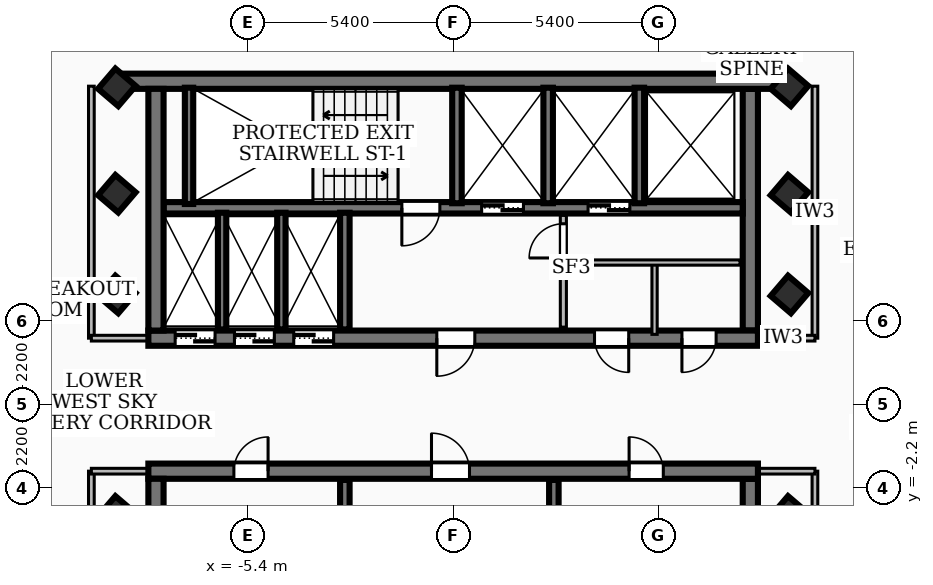
"""IFC4 building model, lengths in metres.
Left out: names, types, materials, properties, quantities, classifications, styles, units other than length and angle.
Written with IfcOpenShell. Run it as: python <this file> out.ifc"""

import sys

from ifc_helpers import new_model, si_unit, direction, frame, frame_2d, origin, origin_2d, place, context, subcontext, project, spatial, rectangle, extrude, element, fill, save


model = new_model("IFC4")
c1 = context("Model", 3, precision=1e-05, world=origin(), true_north=direction((0.0, 1.0)))
c2 = subcontext(c1, "Body", "Model", "MODEL_VIEW")
j1 = project(units=[si_unit("LENGTHUNIT", "METRE"), si_unit("PLANEANGLEUNIT", "RADIAN")], contexts=[c1])
p1 = place(None, origin())
s1 = spatial("IfcSite", under=j1, at=p1, CompositionType="ELEMENT")
p2 = place(p1, origin())
s2 = spatial("IfcBuilding", under=s1, at=p2, CompositionType="ELEMENT")
p3 = place(p2, frame((0.0, 0.0, 250.92)))
s3 = spatial("IfcBuildingStorey", under=s2, at=p3, CompositionType="ELEMENT", Elevation=250.92)
p4 = place(p3, frame((-8.78, 8.51, 0.0), z_axis=(0.0, 0.0, 1.0), x_axis=(1.0, 0.0, 0.0)))
e1 = element("IfcWall", 1, at=p4, inside=s3, PredefinedType="SHEAR", context=c2, shape_type="SweptSolid", body=[
    extrude(rectangle(XDim=17.56, YDim=0.4, at=frame_2d((8.78, 0.0))), origin(), (0.0, 0.0, 1.0), 3.16),
])
p5 = place(p3, frame((8.02, 1.75, 0.0), z_axis=(0.0, 0.0, 1.0), x_axis=(-1.0, 0.0, 0.0)))
e2 = element("IfcWall", 2, at=p5, inside=s3, PredefinedType="SHEAR", context=c2, shape_type="SweptSolid", body=[
    extrude(rectangle(XDim=16.04, YDim=0.4, at=frame_2d((8.02, 0.0))), origin(), (0.0, 0.0, 1.0), 3.16),
])
p6 = place(p5, frame((7.45, 0.0, 0.0)))
e3 = element("IfcOpeningElement", 3, at=p6, cuts=e2, PredefinedType="OPENING", context=c2, shape_type="SweptSolid", body=[
    extrude(rectangle(XDim=1.0, YDim=2.1, at=frame_2d((0.5, 1.05))), frame((0.0, 0.21, 0.0), z_axis=(0.0, -1.0, 0.0), x_axis=(1.0, 0.0, 0.0)), (0.0, 0.0, 1.0), 0.42),
])
p7 = place(p5, frame((14.285, 0.0, 0.0)))
e4 = element("IfcOpeningElement", 4, at=p7, cuts=e2, PredefinedType="OPENING", context=c2, shape_type="SweptSolid", body=[
    extrude(rectangle(XDim=1.05, YDim=2.15, at=frame_2d((0.525, 1.075))), frame((0.0, 0.21, 0.0), z_axis=(0.0, -1.0, 0.0), x_axis=(1.0, 0.0, 0.0)), (0.0, 0.0, 1.0), 0.42),
])
p8 = place(p5, frame((12.725, 0.0, 0.0)))
e5 = element("IfcOpeningElement", 5, at=p8, cuts=e2, PredefinedType="OPENING", context=c2, shape_type="SweptSolid", body=[
    extrude(rectangle(XDim=1.05, YDim=2.15, at=frame_2d((0.525, 1.075))), frame((0.0, 0.21, 0.0), z_axis=(0.0, -1.0, 0.0), x_axis=(1.0, 0.0, 0.0)), (0.0, 0.0, 1.0), 0.42),
])
p9 = place(p5, frame((11.165, 0.0, 0.0)))
e6 = element("IfcOpeningElement", 6, at=p9, cuts=e2, PredefinedType="OPENING", context=c2, shape_type="SweptSolid", body=[
    extrude(rectangle(XDim=1.05, YDim=2.15, at=frame_2d((0.525, 1.075))), frame((0.0, 0.21, 0.0), z_axis=(0.0, -1.0, 0.0), x_axis=(1.0, 0.0, 0.0)), (0.0, 0.0, 1.0), 0.42),
])
p10 = place(p5, frame((3.4, 0.0, 0.0)))
e7 = element("IfcOpeningElement", 7, at=p10, cuts=e2, PredefinedType="OPENING", context=c2, shape_type="SweptSolid", body=[
    extrude(rectangle(XDim=0.9, YDim=2.06, at=frame_2d((0.45, 1.03))), frame((0.0, 0.21, 0.0), z_axis=(0.0, -1.0, 0.0), x_axis=(1.0, 0.0, 0.0)), (0.0, 0.0, 1.0), 0.42),
])
p11 = place(p5, frame((1.1, 0.0, 0.0)))
e8 = element("IfcOpeningElement", 8, at=p11, cuts=e2, PredefinedType="OPENING", context=c2, shape_type="SweptSolid", body=[
    extrude(rectangle(XDim=0.9, YDim=2.06, at=frame_2d((0.45, 1.03))), frame((0.0, 0.21, 0.0), z_axis=(0.0, -1.0, 0.0), x_axis=(1.0, 0.0, 0.0)), (0.0, 0.0, 1.0), 0.42),
])
for number, where, z_axis, x_axis in (
    (9, (-7.82, 1.95, 0.0), (0.0, 0.0, 1.0), (0.0, 1.0, 0.0)),
    (10, (7.82, 8.31, 0.0), (0.0, 0.0, 1.0), (0.0, -1.0, 0.0)),
):
    element("IfcWall", number, at=place(p3, frame(where, z_axis=z_axis, x_axis=x_axis)), inside=s3, PredefinedType="SHEAR", context=c2, shape_type="SweptSolid", body=[
        extrude(rectangle(XDim=6.36, YDim=0.4, at=frame_2d((3.18, 0.0))), origin(), (0.0, 0.0, 1.0), 3.16),
    ])
p12 = place(p3, frame((7.62, 5.18, 0.0), z_axis=(0.0, 0.0, 1.0), x_axis=(-1.0, 0.0, 0.0)))
e11 = element("IfcWall", 11, at=p12, inside=s3, PredefinedType="SOLIDWALL", context=c2, shape_type="SweptSolid", body=[
    extrude(rectangle(XDim=15.24, YDim=0.3, at=frame_2d((7.62, 0.0))), origin(), (0.0, 0.0, 1.0), 3.16),
])
p13 = place(p12, frame((5.77, 0.0, 0.0)))
e12 = element("IfcOpeningElement", 12, at=p13, cuts=e11, PredefinedType="OPENING", context=c2, shape_type="SweptSolid", body=[
    extrude(rectangle(XDim=1.1, YDim=2.15, at=frame_2d((0.55, 1.075))), frame((0.0, 0.16, 0.0), z_axis=(0.0, -1.0, 0.0), x_axis=(1.0, 0.0, 0.0)), (0.0, 0.0, 1.0), 0.32),
])
p14 = place(p12, frame((2.97, 0.0, 0.0)))
e13 = element("IfcOpeningElement", 13, at=p14, cuts=e11, PredefinedType="OPENING", context=c2, shape_type="SweptSolid", body=[
    extrude(rectangle(XDim=1.1, YDim=2.15, at=frame_2d((0.55, 1.075))), frame((0.0, 0.16, 0.0), z_axis=(0.0, -1.0, 0.0), x_axis=(1.0, 0.0, 0.0)), (0.0, 0.0, 1.0), 0.32),
])
p15 = place(p12, frame((7.97, 0.0, 0.0)))
e14 = element("IfcOpeningElement", 14, at=p15, cuts=e11, PredefinedType="OPENING", context=c2, shape_type="SweptSolid", body=[
    extrude(rectangle(XDim=1.0, YDim=2.1, at=frame_2d((0.5, 1.05))), frame((0.0, 0.16, 0.0), z_axis=(0.0, -1.0, 0.0), x_axis=(1.0, 0.0, 0.0)), (0.0, 0.0, 1.0), 0.32),
])
p16 = place(p3, frame((-8.02, -1.75, 0.0), z_axis=(0.0, 0.0, 1.0), x_axis=(1.0, 0.0, 0.0)))
e15 = element("IfcWall", 15, at=p16, inside=s3, PredefinedType="SHEAR", context=c2, shape_type="SweptSolid", body=[
    extrude(rectangle(XDim=16.04, YDim=0.4, at=frame_2d((8.02, 0.0))), origin(), (0.0, 0.0, 1.0), 3.16),
])
p17 = place(p16, frame((7.45, 0.0, 0.0)))
e16 = element("IfcOpeningElement", 16, at=p17, cuts=e15, PredefinedType="OPENING", context=c2, shape_type="SweptSolid", body=[
    extrude(rectangle(XDim=1.0, YDim=2.1, at=frame_2d((0.5, 1.05))), frame((0.0, 0.21, 0.0), z_axis=(0.0, -1.0, 0.0), x_axis=(1.0, 0.0, 0.0)), (0.0, 0.0, 1.0), 0.42),
])
p18 = place(p16, frame((12.65, 0.0, 0.0)))
e17 = element("IfcOpeningElement", 17, at=p18, cuts=e15, PredefinedType="OPENING", context=c2, shape_type="SweptSolid", body=[
    extrude(rectangle(XDim=0.9, YDim=2.06, at=frame_2d((0.45, 1.03))), frame((0.0, 0.21, 0.0), z_axis=(0.0, -1.0, 0.0), x_axis=(1.0, 0.0, 0.0)), (0.0, 0.0, 1.0), 0.42),
])
p19 = place(p16, frame((2.25, 0.0, 0.0)))
e18 = element("IfcOpeningElement", 18, at=p19, cuts=e15, PredefinedType="OPENING", context=c2, shape_type="SweptSolid", body=[
    extrude(rectangle(XDim=0.9, YDim=2.06, at=frame_2d((0.45, 1.03))), frame((0.0, 0.21, 0.0), z_axis=(0.0, -1.0, 0.0), x_axis=(1.0, 0.0, 0.0)), (0.0, 0.0, 1.0), 0.42),
])
for number, where, z_axis, x_axis in (
    (19, (-7.82, -8.31, 0.0), (0.0, 0.0, 1.0), (0.0, 1.0, 0.0)),
    (20, (7.82, -1.95, 0.0), (0.0, 0.0, 1.0), (0.0, -1.0, 0.0)),
):
    element("IfcWall", number, at=place(p3, frame(where, z_axis=z_axis, x_axis=x_axis)), inside=s3, PredefinedType="SHEAR", context=c2, shape_type="SweptSolid", body=[
        extrude(rectangle(XDim=6.36, YDim=0.4, at=frame_2d((3.18, 0.0))), origin(), (0.0, 0.0, 1.0), 3.16),
    ])
p20 = place(p3, frame((-6.95, 5.28, 0.0), z_axis=(0.0, 0.0, 1.0), x_axis=(0.0, 1.0, 0.0)))
e21 = element("IfcWall", 21, at=p20, inside=s3, PredefinedType="SOLIDWALL", context=c2, shape_type="SweptSolid", body=[
    extrude(rectangle(XDim=3.06, YDim=0.22, at=frame_2d((1.53, 0.0))), origin(), (0.0, 0.0, 1.0), 3.16),
])
for number, where, z_axis, x_axis in (
    (22, (0.1, 5.3, 0.0), (0.0, 0.0, 1.0), (0.0, 1.0, 0.0)),
    (23, (2.5, 5.3, 0.0), (0.0, 0.0, 1.0), (0.0, 1.0, 0.0)),
    (24, (4.9, 5.3, 0.0), (0.0, 0.0, 1.0), (0.0, 1.0, 0.0)),
):
    element("IfcWall", number, at=place(p3, frame(where, z_axis=z_axis, x_axis=x_axis)), inside=s3, PredefinedType="SOLIDWALL", context=c2, shape_type="SweptSolid", body=[
        extrude(rectangle(XDim=3.04, YDim=0.25, at=frame_2d((1.52, 0.0))), origin(), (0.0, 0.0, 1.0), 3.16),
    ])
for number, where, z_axis, x_axis in (
    (25, (-2.85, 1.98, 0.0), (0.0, 0.0, 1.0), (0.0, 1.0, 0.0)),
    (26, (-2.85, -5.05, 0.0), (0.0, 0.0, 1.0), (0.0, 1.0, 0.0)),
    (27, (2.65, -5.05, 0.0), (0.0, 0.0, 1.0), (0.0, 1.0, 0.0)),
):
    element("IfcWall", number, at=place(p3, frame(where, z_axis=z_axis, x_axis=x_axis)), inside=s3, PredefinedType="SOLIDWALL", context=c2, shape_type="SweptSolid", body=[
        extrude(rectangle(XDim=3.07, YDim=0.25, at=frame_2d((1.535, 0.0))), origin(), (0.0, 0.0, 1.0), 3.16),
    ])
for number, where, z_axis, x_axis in (
    (28, (-6.08, 1.98, 0.0), (0.0, 0.0, 1.0), (0.0, 1.0, 0.0)),
    (29, (-4.52, 1.98, 0.0), (0.0, 0.0, 1.0), (0.0, 1.0, 0.0)),
):
    element("IfcWall", number, at=place(p3, frame(where, z_axis=z_axis, x_axis=x_axis)), inside=s3, PredefinedType="SOLIDWALL", context=c2, shape_type="SweptSolid", body=[
        extrude(rectangle(XDim=3.07, YDim=0.22, at=frame_2d((1.535, 0.0))), origin(), (0.0, 0.0, 1.0), 3.16),
    ])
for number, where, z_axis, x_axis in (
    (30, (-8.85, -2.9, 0.0), (0.0, 0.0, 1.0), (0.65, 0.76, 0.0)),
    (31, (-8.85, 2.9, 0.0), (0.0, 0.0, 1.0), (0.65, 0.76, 0.0)),
    (32, (-8.85, 5.55, 0.0), (0.0, 0.0, 1.0), (0.65, 0.76, 0.0)),
    (33, (8.85, -2.9, 0.0), (0.0, 0.0, 1.0), (0.65, 0.76, 0.0)),
    (34, (8.85, 2.9, 0.0), (0.0, 0.0, 1.0), (0.65, 0.76, 0.0)),
    (35, (8.85, 5.55, 0.0), (0.0, 0.0, 1.0), (0.65, 0.76, 0.0)),
    (36, (-8.85, 8.35, 0.0), (0.0, 0.0, 1.0), (0.65, 0.76, 0.0)),
    (37, (8.85, 8.35, 0.0), (0.0, 0.0, 1.0), (0.65, 0.76, 0.0)),
):
    element("IfcColumn", number, at=place(p3, frame(where, z_axis=z_axis, x_axis=x_axis)), inside=s3, PredefinedType="COLUMN", context=c2, shape_type="SweptSolid", body=[
        extrude(rectangle(XDim=0.7, YDim=0.7, at=origin_2d()), origin(), (0.0, 0.0, 1.0), 3.42),
    ])
p21 = place(p3, frame((2.9, 2.04, 0.0), z_axis=(0.0, 0.0, 1.0), x_axis=(0.0, 1.0, 0.0)))
e38 = element("IfcWall", 38, at=p21, inside=s3, PredefinedType="PARTITIONING", context=c2, shape_type="SweptSolid", body=[
    extrude(rectangle(XDim=2.94, YDim=0.16, at=frame_2d((1.47, 0.0))), origin(), (0.0, 0.0, 1.0), 2.39),
])
p22 = place(p21, frame((1.82, 0.0, 0.0)))
e39 = element("IfcOpeningElement", 39, at=p22, cuts=e38, PredefinedType="OPENING", context=c2, shape_type="SweptSolid", body=[
    extrude(rectangle(XDim=0.9, YDim=2.06, at=frame_2d((0.45, 1.03))), frame((0.0, 0.09, 0.0), z_axis=(0.0, -1.0, 0.0), x_axis=(1.0, 0.0, 0.0)), (0.0, 0.0, 1.0), 0.18),
])
p23 = place(p3, frame((2.9, 3.74, 0.0), z_axis=(0.0, 0.0, 1.0), x_axis=(1.0, 0.0, 0.0)))
e40 = element("IfcWall", 40, at=p23, inside=s3, PredefinedType="PARTITIONING", context=c2, shape_type="SweptSolid", body=[
    extrude(rectangle(XDim=4.65, YDim=0.138, at=frame_2d((2.325, 0.0))), origin(), (0.0, 0.0, 1.0), 3.16),
])
p24 = place(p3, frame((5.3, 1.85, 0.0), z_axis=(0.0, 0.0, 1.0), x_axis=(0.0, 1.0, 0.0)))
e41 = element("IfcWall", 41, at=p24, inside=s3, PredefinedType="PARTITIONING", context=c2, shape_type="SweptSolid", body=[
    extrude(rectangle(XDim=1.89, YDim=0.138, at=frame_2d((0.945, 0.0))), origin(), (0.0, 0.0, 1.0), 2.39),
])
p25 = place(p3, frame((-9.52, 1.75, 0.0), z_axis=(0.0, 0.0, 1.0), x_axis=(0.0, 1.0, 0.0)))
e42 = element("IfcWall", 42, at=p25, inside=s3, PredefinedType="PARTITIONING", context=c2, shape_type="SweptSolid", body=[
    extrude(rectangle(XDim=6.63, YDim=0.15, at=frame_2d((3.315, 0.0))), origin(), (0.0, 0.0, 1.0), 2.53),
])
p26 = place(p3, frame((-7.85, 1.75, 0.0), z_axis=(0.0, 0.0, 1.0), x_axis=(-1.0, 0.0, 0.0)))
e43 = element("IfcWall", 43, at=p26, inside=s3, PredefinedType="PARTITIONING", context=c2, shape_type="SweptSolid", body=[
    extrude(rectangle(XDim=1.67, YDim=0.15, at=frame_2d((0.835, 0.0))), origin(), (0.0, 0.0, 1.0), 2.39),
])
p27 = place(p3, frame((-9.52, -8.38, 0.0), z_axis=(0.0, 0.0, 1.0), x_axis=(0.0, 1.0, 0.0)))
e44 = element("IfcWall", 44, at=p27, inside=s3, PredefinedType="PARTITIONING", context=c2, shape_type="SweptSolid", body=[
    extrude(rectangle(XDim=6.63, YDim=0.15, at=frame_2d((3.315, 0.0))), origin(), (0.0, 0.0, 1.0), 3.16),
])
p28 = place(p3, frame((-7.85, -1.75, 0.0), z_axis=(0.0, 0.0, 1.0), x_axis=(-1.0, 0.0, 0.0)))
e45 = element("IfcWall", 45, at=p28, inside=s3, PredefinedType="PARTITIONING", context=c2, shape_type="SweptSolid", body=[
    extrude(rectangle(XDim=1.67, YDim=0.15, at=frame_2d((0.835, 0.0))), origin(), (0.0, 0.0, 1.0), 2.39),
])
p29 = place(p3, frame((9.52, 1.75, 0.0), z_axis=(0.0, 0.0, 1.0), x_axis=(0.0, 1.0, 0.0)))
e46 = element("IfcWall", 46, at=p29, inside=s3, PredefinedType="PARTITIONING", context=c2, shape_type="SweptSolid", body=[
    extrude(rectangle(XDim=6.63, YDim=0.15, at=frame_2d((3.315, 0.0))), origin(), (0.0, 0.0, 1.0), 3.16),
])
p30 = place(p3, frame((7.85, 1.75, 0.0), z_axis=(0.0, 0.0, 1.0), x_axis=(1.0, 0.0, 0.0)))
e47 = element("IfcWall", 47, at=p30, inside=s3, PredefinedType="PARTITIONING", context=c2, shape_type="SweptSolid", body=[
    extrude(rectangle(XDim=1.67, YDim=0.15, at=frame_2d((0.835, 0.0))), origin(), (0.0, 0.0, 1.0), 2.39),
])
p31 = place(p3, frame((9.52, -8.38, 0.0), z_axis=(0.0, 0.0, 1.0), x_axis=(0.0, 1.0, 0.0)))
e48 = element("IfcWall", 48, at=p31, inside=s3, PredefinedType="PARTITIONING", context=c2, shape_type="SweptSolid", body=[
    extrude(rectangle(XDim=6.63, YDim=0.15, at=frame_2d((3.315, 0.0))), origin(), (0.0, 0.0, 1.0), 2.53),
])
p32 = place(p3, frame((7.85, -1.75, 0.0), z_axis=(0.0, 0.0, 1.0), x_axis=(1.0, 0.0, 0.0)))
e49 = element("IfcWall", 49, at=p32, inside=s3, PredefinedType="PARTITIONING", context=c2, shape_type="SweptSolid", body=[
    extrude(rectangle(XDim=1.67, YDim=0.15, at=frame_2d((0.835, 0.0))), origin(), (0.0, 0.0, 1.0), 2.39),
])
p33 = place(p3, frame((16.372, 4.796, 0.0), z_axis=(0.0, 0.0, 1.0), x_axis=(-0.759640163548, 0.650343618348, 0.0)))
e50 = element("IfcWall", 50, at=p33, inside=s3, PredefinedType="PARTITIONING", context=c2, shape_type="SweptSolid", body=[
    extrude(rectangle(XDim=7.95, YDim=0.11, at=frame_2d((3.975, 0.0))), origin(), (0.0, 0.0, 1.0), 2.53),
])
p34 = place(p3, frame((6.252, 16.894, 0.0), z_axis=(0.0, 0.0, 1.0), x_axis=(0.759715677597, -0.650255403063, 0.0)))
e51 = element("IfcWall", 51, at=p34, inside=s3, PredefinedType="PARTITIONING", context=c2, shape_type="SweptSolid", body=[
    extrude(rectangle(XDim=12.571, YDim=0.11, at=frame_2d((6.285, 0.0))), origin(), (0.0, 0.0, 1.0), 2.53),
])
p35 = place(p34, frame((6.655, 0.0, 0.0)))
e52 = element("IfcOpeningElement", 52, at=p35, cuts=e51, PredefinedType="OPENING", context=c2, shape_type="SweptSolid", body=[
    extrude(rectangle(XDim=0.86, YDim=2.04, at=frame_2d((0.43, 1.02))), frame((0.0, 0.065, 0.0), z_axis=(0.0, -1.0, 0.0), x_axis=(1.0, 0.0, 0.0)), (0.0, 0.0, 1.0), 0.13),
])
p36 = place(p34, frame((5.455, 0.0, 0.0)))
e53 = element("IfcOpeningElement", 53, at=p36, cuts=e51, PredefinedType="OPENING", context=c2, shape_type="SweptSolid", body=[
    extrude(rectangle(XDim=0.86, YDim=2.04, at=frame_2d((0.43, 1.02))), frame((0.0, 0.065, 0.0), z_axis=(0.0, -1.0, 0.0), x_axis=(1.0, 0.0, 0.0)), (0.0, 0.0, 1.0), 0.13),
])
p37 = place(p3, frame((-17.437, 1.604, 0.0), z_axis=(0.0, 0.0, 1.0), x_axis=(0.650265099033, 0.759707378522, 0.0)))
e54 = element("IfcWall", 54, at=p37, inside=s3, PredefinedType="PARTITIONING", context=c2, shape_type="SweptSolid", body=[
    extrude(rectangle(XDim=20.139, YDim=0.11, at=frame_2d((10.07, 0.0))), origin(), (0.0, 0.0, 1.0), 2.53),
])
p38 = place(p37, frame((10.959, 0.0, 0.0)))
e55 = element("IfcOpeningElement", 55, at=p38, cuts=e54, PredefinedType="OPENING", context=c2, shape_type="SweptSolid", body=[
    extrude(rectangle(XDim=0.86, YDim=2.04, at=frame_2d((0.43, 1.02))), frame((0.0, 0.065, 0.0), z_axis=(0.0, -1.0, 0.0), x_axis=(1.0, 0.0, 0.0)), (0.0, 0.0, 1.0), 0.13),
])
p39 = place(p37, frame((9.519, 0.0, 0.0)))
e56 = element("IfcOpeningElement", 56, at=p39, cuts=e54, PredefinedType="OPENING", context=c2, shape_type="SweptSolid", body=[
    extrude(rectangle(XDim=0.86, YDim=2.04, at=frame_2d((0.43, 1.02))), frame((0.0, 0.065, 0.0), z_axis=(0.0, -1.0, 0.0), x_axis=(1.0, 0.0, 0.0)), (0.0, 0.0, 1.0), 0.13),
])
p40 = place(p3, frame((17.437, -1.604, 0.0), z_axis=(0.0, 0.0, 1.0), x_axis=(-0.650265099033, -0.759707378522, 0.0)))
e57 = element("IfcWall", 57, at=p40, inside=s3, PredefinedType="PARTITIONING", context=c2, shape_type="SweptSolid", body=[
    extrude(rectangle(XDim=20.139, YDim=0.11, at=frame_2d((10.07, 0.0))), origin(), (0.0, 0.0, 1.0), 2.53),
])
p41 = place(p40, frame((9.859, 0.0, 0.0)))
e58 = element("IfcOpeningElement", 58, at=p41, cuts=e57, PredefinedType="OPENING", context=c2, shape_type="SweptSolid", body=[
    extrude(rectangle(XDim=0.86, YDim=2.04, at=frame_2d((0.43, 1.02))), frame((0.0, 0.065, 0.0), z_axis=(0.0, -1.0, 0.0), x_axis=(1.0, 0.0, 0.0)), (0.0, 0.0, 1.0), 0.13),
])
p42 = place(p40, frame((8.419, 0.0, 0.0)))
e59 = element("IfcOpeningElement", 59, at=p42, cuts=e57, PredefinedType="OPENING", context=c2, shape_type="SweptSolid", body=[
    extrude(rectangle(XDim=0.86, YDim=2.04, at=frame_2d((0.43, 1.02))), frame((0.0, 0.065, 0.0), z_axis=(0.0, -1.0, 0.0), x_axis=(1.0, 0.0, 0.0)), (0.0, 0.0, 1.0), 0.13),
])
p43 = place(p6, origin())
e60 = element("IfcDoor", 60, at=p43, inside=s3, OperationType="SINGLE_SWING_RIGHT", PredefinedType="DOOR", context=c2, shape_type="SweptSolid", body=[
    extrude(rectangle(XDim=1.0, YDim=2.1, at=frame_2d((0.5, 1.05))), frame((0.0, 0.025, 0.0), z_axis=(0.0, -1.0, 0.0), x_axis=(1.0, 0.0, 0.0)), (0.0, 0.0, 1.0), 0.05),
])
fill(e3, e60)
p44 = place(p17, origin())
e61 = element("IfcDoor", 61, at=p44, inside=s3, OperationType="SINGLE_SWING_LEFT", PredefinedType="DOOR", context=c2, shape_type="SweptSolid", body=[
    extrude(rectangle(XDim=1.0, YDim=2.1, at=frame_2d((0.5, 1.05))), frame((0.0, 0.025, 0.0), z_axis=(0.0, -1.0, 0.0), x_axis=(1.0, 0.0, 0.0)), (0.0, 0.0, 1.0), 0.05),
])
fill(e16, e61)
p45 = place(p13, origin())
e62 = element("IfcDoor", 62, at=p45, inside=s3, OperationType="DOUBLE_DOOR_SLIDING", PredefinedType="DOOR", context=c2, shape_type="SweptSolid", body=[
    extrude(rectangle(XDim=1.1, YDim=2.15, at=frame_2d((0.55, 1.075))), frame((0.0, 0.025, 0.0), z_axis=(0.0, -1.0, 0.0), x_axis=(1.0, 0.0, 0.0)), (0.0, 0.0, 1.0), 0.05),
])
fill(e12, e62)
p46 = place(p14, origin())
e63 = element("IfcDoor", 63, at=p46, inside=s3, OperationType="DOUBLE_DOOR_SLIDING", PredefinedType="DOOR", context=c2, shape_type="SweptSolid", body=[
    extrude(rectangle(XDim=1.1, YDim=2.15, at=frame_2d((0.55, 1.075))), frame((0.0, 0.025, 0.0), z_axis=(0.0, -1.0, 0.0), x_axis=(1.0, 0.0, 0.0)), (0.0, 0.0, 1.0), 0.05),
])
fill(e13, e63)
p47 = place(p15, origin())
e64 = element("IfcDoor", 64, at=p47, inside=s3, OperationType="SINGLE_SWING_RIGHT", PredefinedType="DOOR", context=c2, shape_type="SweptSolid", body=[
    extrude(rectangle(XDim=1.0, YDim=2.1, at=frame_2d((0.5, 1.05))), frame((0.0, 0.025, 0.0), z_axis=(0.0, -1.0, 0.0), x_axis=(1.0, 0.0, 0.0)), (0.0, 0.0, 1.0), 0.05),
])
fill(e14, e64)
p48 = place(p7, origin())
e65 = element("IfcDoor", 65, at=p48, inside=s3, OperationType="DOUBLE_DOOR_SLIDING", PredefinedType="DOOR", context=c2, shape_type="SweptSolid", body=[
    extrude(rectangle(XDim=1.05, YDim=2.15, at=frame_2d((0.525, 1.075))), frame((0.0, 0.025, 0.0), z_axis=(0.0, -1.0, 0.0), x_axis=(1.0, 0.0, 0.0)), (0.0, 0.0, 1.0), 0.05),
])
fill(e4, e65)
p49 = place(p8, origin())
e66 = element("IfcDoor", 66, at=p49, inside=s3, OperationType="DOUBLE_DOOR_SLIDING", PredefinedType="DOOR", context=c2, shape_type="SweptSolid", body=[
    extrude(rectangle(XDim=1.05, YDim=2.15, at=frame_2d((0.525, 1.075))), frame((0.0, 0.025, 0.0), z_axis=(0.0, -1.0, 0.0), x_axis=(1.0, 0.0, 0.0)), (0.0, 0.0, 1.0), 0.05),
])
fill(e5, e66)
p50 = place(p9, origin())
e67 = element("IfcDoor", 67, at=p50, inside=s3, OperationType="DOUBLE_DOOR_SLIDING", PredefinedType="DOOR", context=c2, shape_type="SweptSolid", body=[
    extrude(rectangle(XDim=1.05, YDim=2.15, at=frame_2d((0.525, 1.075))), frame((0.0, 0.025, 0.0), z_axis=(0.0, -1.0, 0.0), x_axis=(1.0, 0.0, 0.0)), (0.0, 0.0, 1.0), 0.05),
])
fill(e6, e67)
p51 = place(p18, origin())
e68 = element("IfcDoor", 68, at=p51, inside=s3, OperationType="SINGLE_SWING_LEFT", PredefinedType="DOOR", context=c2, shape_type="SweptSolid", body=[
    extrude(rectangle(XDim=0.9, YDim=2.06, at=frame_2d((0.45, 1.03))), frame((0.0, 0.025, 0.0), z_axis=(0.0, -1.0, 0.0), x_axis=(1.0, 0.0, 0.0)), (0.0, 0.0, 1.0), 0.05),
])
fill(e17, e68)
p52 = place(p19, origin())
e69 = element("IfcDoor", 69, at=p52, inside=s3, OperationType="SINGLE_SWING_RIGHT", PredefinedType="DOOR", context=c2, shape_type="SweptSolid", body=[
    extrude(rectangle(XDim=0.9, YDim=2.06, at=frame_2d((0.45, 1.03))), frame((0.0, 0.025, 0.0), z_axis=(0.0, -1.0, 0.0), x_axis=(1.0, 0.0, 0.0)), (0.0, 0.0, 1.0), 0.05),
])
fill(e18, e69)
p53 = place(p10, origin())
e70 = element("IfcDoor", 70, at=p53, inside=s3, OperationType="SINGLE_SWING_LEFT", PredefinedType="DOOR", context=c2, shape_type="SweptSolid", body=[
    extrude(rectangle(XDim=0.9, YDim=2.06, at=frame_2d((0.45, 1.03))), frame((0.0, 0.025, 0.0), z_axis=(0.0, -1.0, 0.0), x_axis=(1.0, 0.0, 0.0)), (0.0, 0.0, 1.0), 0.05),
])
fill(e7, e70)
p54 = place(p11, origin())
e71 = element("IfcDoor", 71, at=p54, inside=s3, OperationType="SINGLE_SWING_RIGHT", PredefinedType="DOOR", context=c2, shape_type="SweptSolid", body=[
    extrude(rectangle(XDim=0.9, YDim=2.06, at=frame_2d((0.45, 1.03))), frame((0.0, 0.025, 0.0), z_axis=(0.0, -1.0, 0.0), x_axis=(1.0, 0.0, 0.0)), (0.0, 0.0, 1.0), 0.05),
])
fill(e8, e71)
p55 = place(p22, origin())
e72 = element("IfcDoor", 72, at=p55, inside=s3, OperationType="SINGLE_SWING_LEFT", PredefinedType="DOOR", context=c2, shape_type="SweptSolid", body=[
    extrude(rectangle(XDim=0.9, YDim=2.06, at=frame_2d((0.45, 1.03))), frame((0.0, 0.025, 0.0), z_axis=(0.0, -1.0, 0.0), x_axis=(1.0, 0.0, 0.0)), (0.0, 0.0, 1.0), 0.05),
])
fill(e39, e72)
save(model, sys.argv[1])
